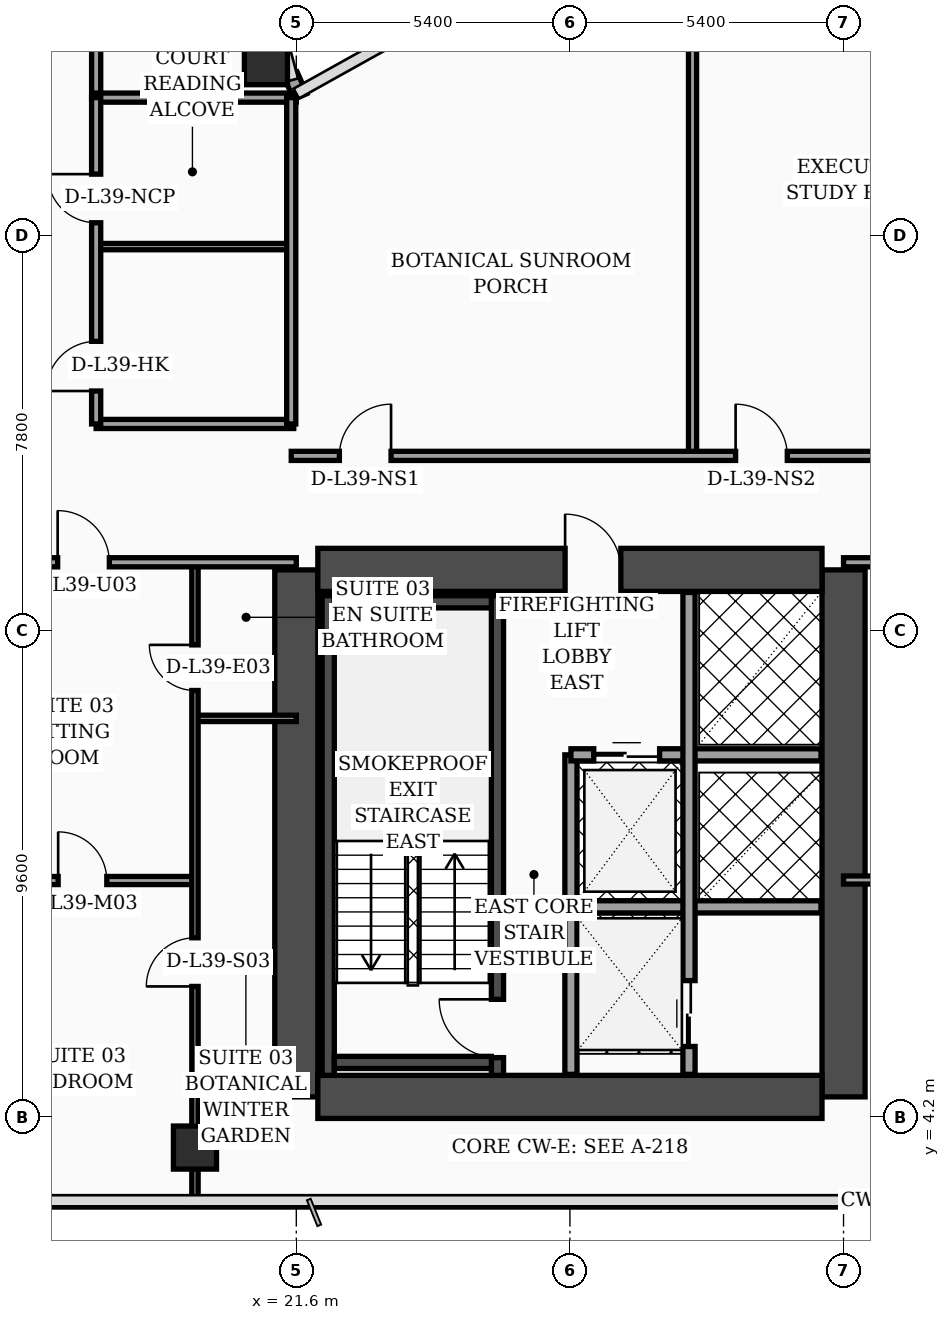
"""IFC4 building model, lengths in metres.
Left out: names, types, materials, properties, quantities, classifications, styles, units other than length and angle.
Written with IfcOpenShell. Run it as: python <this file> out.ifc"""

import sys

from ifc_helpers import new_model, si_unit, direction, frame, frame_2d, origin, origin_2d, place, context, subcontext, project, spatial, rectangle, hollow_rectangle, extrude, element, fill, save


model = new_model("IFC4")
c1 = context("Model", 3, precision=1e-05, world=origin(), true_north=direction((0.0, 1.0)))
c2 = subcontext(c1, "Body", "Model", "MODEL_VIEW")
j1 = project(units=[si_unit("LENGTHUNIT", "METRE"), si_unit("PLANEANGLEUNIT", "RADIAN")], contexts=[c1])
p1 = place(None, origin())
s1 = spatial("IfcSite", under=j1, at=p1, CompositionType="ELEMENT")
p2 = place(p1, origin())
s2 = spatial("IfcBuilding", under=s1, at=p2, CompositionType="ELEMENT")
p3 = place(p2, frame((0.0, 0.0, 159.9)))
s3 = spatial("IfcBuildingStorey", under=s2, at=p3, CompositionType="ELEMENT", Elevation=159.9)
for number, where, z_axis, x_axis in (
    (1, (21.6, 4.6, 0.0), (0.0, 0.0, 1.0), (0.0, 1.0, 0.0)),
    (2, (32.4, 4.6, 0.0), (0.0, 0.0, 1.0), (0.0, 1.0, 0.0)),
):
    element("IfcWall", number, at=place(p3, frame(where, z_axis=z_axis, x_axis=x_axis)), inside=s3, PredefinedType="SHEAR", context=c2, shape_type="SweptSolid", body=[
        extrude(rectangle(XDim=10.4, YDim=0.85, at=frame_2d((5.2, 0.0))), origin(), (0.0, 0.0, 1.0), 3.56),
    ])
p4 = place(p3, frame((22.025, 15.0, 0.0), z_axis=(0.0, 0.0, 1.0), x_axis=(1.0, 0.0, 0.0)))
e3 = element("IfcWall", 3, at=p4, inside=s3, PredefinedType="SHEAR", context=c2, shape_type="SweptSolid", body=[
    extrude(rectangle(XDim=9.95, YDim=0.85, at=frame_2d((4.975, 0.0))), origin(), (0.0, 0.0, 1.0), 3.56),
])
p5 = place(p4, frame((4.88, 0.0, 0.0)))
e4 = element("IfcOpeningElement", 4, at=p5, cuts=e3, PredefinedType="OPENING", context=c2, shape_type="SweptSolid", body=[
    extrude(rectangle(XDim=1.1, YDim=2.2, at=frame_2d((0.55, 1.1))), frame((0.0, 0.435, 0.0), z_axis=(0.0, -1.0, 0.0), x_axis=(1.0, 0.0, 0.0)), (0.0, 0.0, 1.0), 0.87),
])
p6 = place(p3, frame((22.025, 4.6, 0.0), z_axis=(0.0, 0.0, 1.0), x_axis=(1.0, 0.0, 0.0)))
e5 = element("IfcWall", 5, at=p6, inside=s3, PredefinedType="SHEAR", context=c2, shape_type="SweptSolid", body=[
    extrude(rectangle(XDim=9.95, YDim=0.85, at=frame_2d((4.975, 0.0))), origin(), (0.0, 0.0, 1.0), 3.56),
])
p7 = place(p3, frame((22.23, 5.025, 0.0), z_axis=(0.0, 0.0, 1.0), x_axis=(0.0, 1.0, 0.0)))
e6 = element("IfcWall", 6, at=p7, inside=s3, PredefinedType="SOLIDWALL", context=c2, shape_type="SweptSolid", body=[
    extrude(rectangle(XDim=9.465, YDim=0.24, at=frame_2d((4.732, 0.0))), origin(), (0.0, 0.0, 1.0), 3.56),
])
p8 = place(p3, frame((25.57, 5.025, 0.0), z_axis=(0.0, 0.0, 1.0), x_axis=(0.0, 1.0, 0.0)))
e7 = element("IfcWall", 7, at=p8, inside=s3, PredefinedType="SOLIDWALL", context=c2, shape_type="SweptSolid", body=[
    extrude(rectangle(XDim=9.465, YDim=0.24, at=frame_2d((4.732, 0.0))), origin(), (0.0, 0.0, 1.0), 3.56),
])
p9 = place(p8, frame((0.35, 0.0, 0.0)))
e8 = element("IfcOpeningElement", 8, at=p9, cuts=e7, PredefinedType="OPENING", context=c2, shape_type="SweptSolid", body=[
    extrude(rectangle(XDim=1.15, YDim=2.2, at=frame_2d((0.575, 1.1))), frame((0.0, 0.13, 0.0), z_axis=(0.0, -1.0, 0.0), x_axis=(1.0, 0.0, 0.0)), (0.0, 0.0, 1.0), 0.26),
])
for number, where, z_axis, x_axis in (
    (9, (22.35, 5.28, 0.0), (0.0, 0.0, 1.0), (1.0, 0.0, 0.0)),
    (10, (22.35, 14.37, 0.0), (0.0, 0.0, 1.0), (1.0, 0.0, 0.0)),
):
    element("IfcWall", number, at=place(p3, frame(where, z_axis=z_axis, x_axis=x_axis)), inside=s3, PredefinedType="SOLIDWALL", context=c2, shape_type="SweptSolid", body=[
        extrude(rectangle(XDim=3.1, YDim=0.24, at=frame_2d((1.55, 0.0))), origin(), (0.0, 0.0, 1.0), 3.56),
    ])
for number, where, z_axis, x_axis in (
    (11, (21.0, 25.0, 0.0), (0.0, 0.0, 1.0), (1.0, 0.0, 0.0)),
    (12, (19.6, 3.6, 0.0), (0.0, 0.0, 1.0), (1.0, 0.0, 0.0)),
):
    element("IfcColumn", number, at=place(p3, frame(where, z_axis=z_axis, x_axis=x_axis)), inside=s3, PredefinedType="COLUMN", context=c2, shape_type="SweptSolid", body=[
        extrude(hollow_rectangle(XDim=0.85, YDim=0.85, WallThickness=0.036, at=origin_2d()), origin(), (0.0, 0.0, 1.0), 3.56),
    ])
p10 = place(p3, frame((21.68, 24.34, 0.0), z_axis=(0.0, 0.0, 1.0), x_axis=(-0.40758134973, 0.913168901875, 0.0)))
e13 = element("IfcWall", 13, at=p10, inside=s3, PredefinedType="SOLIDWALL", context=c2, shape_type="SweptSolid", body=[
    extrude(rectangle(XDim=0.471, YDim=0.28, at=frame_2d((0.235, 0.0))), origin(), (0.0, 0.0, 1.0), 3.56),
])
p11 = place(p3, frame((27.02, 5.045, 0.0), z_axis=(0.0, 0.0, 1.0), x_axis=(0.0, 1.0, 0.0)))
e14 = element("IfcWall", 14, at=p11, inside=s3, PredefinedType="SOLIDWALL", context=c2, shape_type="SweptSolid", body=[
    extrude(rectangle(XDim=6.305, YDim=0.24, at=frame_2d((3.153, 0.0))), origin(), (0.0, 0.0, 1.0), 3.56),
])
p12 = place(p3, frame((27.02, 11.35, 0.0), z_axis=(0.0, 0.0, 1.0), x_axis=(1.0, 0.0, 0.0)))
e15 = element("IfcWall", 15, at=p12, inside=s3, PredefinedType="SOLIDWALL", context=c2, shape_type="SweptSolid", body=[
    extrude(rectangle(XDim=4.935, YDim=0.24, at=frame_2d((2.468, 0.0))), origin(), (0.0, 0.0, 1.0), 3.56),
])
p13 = place(p12, frame((0.45, 0.0, 0.0)))
e16 = element("IfcOpeningElement", 16, at=p13, cuts=e15, PredefinedType="OPENING", context=c2, shape_type="SweptSolid", body=[
    extrude(rectangle(XDim=1.3, YDim=2.35, at=frame_2d((0.65, 1.175))), frame((0.0, 0.13, 0.0), z_axis=(0.0, -1.0, 0.0), x_axis=(1.0, 0.0, 0.0)), (0.0, 0.0, 1.0), 0.26),
])
p14 = place(p3, frame((27.02, 8.35, 0.0), z_axis=(0.0, 0.0, 1.0), x_axis=(1.0, 0.0, 0.0)))
e17 = element("IfcWall", 17, at=p14, inside=s3, PredefinedType="SOLIDWALL", context=c2, shape_type="SweptSolid", body=[
    extrude(rectangle(XDim=4.935, YDim=0.24, at=frame_2d((2.468, 0.0))), origin(), (0.0, 0.0, 1.0), 3.56),
])
p15 = place(p3, frame((29.35, 5.045, 0.0), z_axis=(0.0, 0.0, 1.0), x_axis=(0.0, 1.0, 0.0)))
e18 = element("IfcWall", 18, at=p15, inside=s3, PredefinedType="SOLIDWALL", context=c2, shape_type="SweptSolid", body=[
    extrude(rectangle(XDim=9.51, YDim=0.24, at=frame_2d((4.755, 0.0))), origin(), (0.0, 0.0, 1.0), 3.56),
])
p16 = place(p15, frame((0.55, 0.0, 0.0)))
e19 = element("IfcOpeningElement", 19, at=p16, cuts=e18, PredefinedType="OPENING", context=c2, shape_type="SweptSolid", body=[
    extrude(rectangle(XDim=1.3, YDim=2.35, at=frame_2d((0.65, 1.175))), frame((0.0, 0.13, 0.0), z_axis=(0.0, -1.0, 0.0), x_axis=(1.0, 0.0, 0.0)), (0.0, 0.0, 1.0), 0.26),
])
p17 = place(p3, frame((19.6, 12.07, 0.0), z_axis=(0.0, 0.0, 1.0), x_axis=(1.0, 0.0, 0.0)))
e20 = element("IfcWall", 20, at=p17, inside=s3, PredefinedType="PARTITIONING", context=c2, shape_type="SweptSolid", body=[
    extrude(rectangle(XDim=2.0, YDim=0.125, at=frame_2d((1.0, 0.0))), origin(), (0.0, 0.0, 1.0), 3.56),
])
p18 = place(p3, frame((15.15, 8.87, 0.0), z_axis=(0.0, 0.0, 1.0), x_axis=(1.0, 0.0, 0.0)))
e21 = element("IfcWall", 21, at=p18, inside=s3, PredefinedType="PARTITIONING", context=c2, shape_type="SweptSolid", body=[
    extrude(rectangle(XDim=4.45, YDim=0.16, at=frame_2d((2.225, 0.0))), origin(), (0.0, 0.0, 1.0), 3.56),
])
p19 = place(p18, frame((1.75, 0.0, 0.0)))
e22 = element("IfcOpeningElement", 22, at=p19, cuts=e21, PredefinedType="OPENING", context=c2, shape_type="SweptSolid", body=[
    extrude(rectangle(XDim=0.96, YDim=2.2, at=frame_2d((0.48, 1.1))), frame((0.0, 0.09, 0.0), z_axis=(0.0, -1.0, 0.0), x_axis=(1.0, 0.0, 0.0)), (0.0, 0.0, 1.0), 0.18),
])
p20 = place(p3, frame((19.6, 2.44, 0.0), z_axis=(0.0, 0.0, 1.0), x_axis=(0.0, 1.0, 0.0)))
e23 = element("IfcWall", 23, at=p20, inside=s3, PredefinedType="PARTITIONING", context=c2, shape_type="SweptSolid", body=[
    extrude(rectangle(XDim=12.71, YDim=0.125, at=frame_2d((6.355, 0.0))), origin(), (0.0, 0.0, 1.0), 2.49),
])
p21 = place(p20, frame((4.34, 0.0, 0.0)))
e24 = element("IfcOpeningElement", 24, at=p21, cuts=e23, PredefinedType="OPENING", context=c2, shape_type="SweptSolid", body=[
    extrude(rectangle(XDim=0.96, YDim=2.2, at=frame_2d((0.48, 1.1))), frame((0.0, 0.073, 0.0), z_axis=(0.0, -1.0, 0.0), x_axis=(1.0, 0.0, 0.0)), (0.0, 0.0, 1.0), 0.145),
])
p22 = place(p20, frame((10.18, 0.0, 0.0)))
e25 = element("IfcOpeningElement", 25, at=p22, cuts=e23, PredefinedType="OPENING", context=c2, shape_type="SweptSolid", body=[
    extrude(rectangle(XDim=0.9, YDim=2.15, at=frame_2d((0.45, 1.075))), frame((0.0, 0.073, 0.0), z_axis=(0.0, -1.0, 0.0), x_axis=(1.0, 0.0, 0.0)), (0.0, 0.0, 1.0), 0.145),
])
p23 = place(p3, frame((15.15, 15.15, 0.0), z_axis=(0.0, 0.0, 1.0), x_axis=(1.0, 0.0, 0.0)))
e26 = element("IfcWall", 26, at=p23, inside=s3, PredefinedType="PARTITIONING", context=c2, shape_type="SweptSolid", body=[
    extrude(rectangle(XDim=6.45, YDim=0.18, at=frame_2d((3.225, 0.0))), origin(), (0.0, 0.0, 1.0), 2.49),
])
p24 = place(p23, frame((1.74, 0.0, 0.0)))
e27 = element("IfcOpeningElement", 27, at=p24, cuts=e26, PredefinedType="OPENING", context=c2, shape_type="SweptSolid", body=[
    extrude(rectangle(XDim=1.02, YDim=2.2, at=frame_2d((0.51, 1.1))), frame((0.0, 0.1, 0.0), z_axis=(0.0, -1.0, 0.0), x_axis=(1.0, 0.0, 0.0)), (0.0, 0.0, 1.0), 0.2),
])
p25 = place(p3, frame((17.65, 24.3, 0.0), z_axis=(0.0, 0.0, 1.0), x_axis=(0.0, 1.0, 0.0)))
e28 = element("IfcWall", 28, at=p25, inside=s3, PredefinedType="PARTITIONING", context=c2, shape_type="SweptSolid", body=[
    extrude(rectangle(XDim=17.65, YDim=0.18, at=frame_2d((8.825, 0.0))), origin(), (0.0, 0.0, 1.0), 2.94),
])
p26 = place(p3, frame((17.65, 17.88, 0.0), z_axis=(0.0, 0.0, 1.0), x_axis=(1.0, 0.0, 0.0)))
e29 = element("IfcWall", 29, at=p26, inside=s3, PredefinedType="PARTITIONING", context=c2, shape_type="SweptSolid", body=[
    extrude(rectangle(XDim=3.9, YDim=0.18, at=frame_2d((1.95, 0.0))), origin(), (0.0, 0.0, 1.0), 3.56),
])
p27 = place(p3, frame((17.65, 21.38, 0.0), z_axis=(0.0, 0.0, 1.0), x_axis=(1.0, 0.0, 0.0)))
e30 = element("IfcWall", 30, at=p27, inside=s3, PredefinedType="PARTITIONING", context=c2, shape_type="SweptSolid", body=[
    extrude(rectangle(XDim=3.9, YDim=0.125, at=frame_2d((1.95, 0.0))), origin(), (0.0, 0.0, 1.0), 3.09),
])
p28 = place(p3, frame((17.65, 24.32, 0.0), z_axis=(0.0, 0.0, 1.0), x_axis=(1.0, 0.0, 0.0)))
e31 = element("IfcWall", 31, at=p28, inside=s3, PredefinedType="PARTITIONING", context=c2, shape_type="SweptSolid", body=[
    extrude(rectangle(XDim=3.95, YDim=0.18, at=frame_2d((1.975, 0.0))), origin(), (0.0, 0.0, 1.0), 3.56),
])
p29 = place(p3, frame((21.5, 17.88, 0.0), z_axis=(0.0, 0.0, 1.0), x_axis=(0.0, 1.0, 0.0)))
e32 = element("IfcWall", 32, at=p29, inside=s3, PredefinedType="PARTITIONING", context=c2, shape_type="SweptSolid", body=[
    extrude(rectangle(XDim=6.44, YDim=0.18, at=frame_2d((3.22, 0.0))), origin(), (0.0, 0.0, 1.0), 3.09),
])
p30 = place(p3, frame((17.65, 17.88, 0.0), z_axis=(0.0, 0.0, 1.0), x_axis=(0.0, 1.0, 0.0)))
e33 = element("IfcWall", 33, at=p30, inside=s3, PredefinedType="PARTITIONING", context=c2, shape_type="SweptSolid", body=[
    extrude(rectangle(XDim=6.44, YDim=0.18, at=frame_2d((3.22, 0.0))), origin(), (0.0, 0.0, 1.0), 3.09),
])
p31 = place(p30, frame((0.65, 0.0, 0.0)))
e34 = element("IfcOpeningElement", 34, at=p31, cuts=e33, PredefinedType="OPENING", context=c2, shape_type="SweptSolid", body=[
    extrude(rectangle(XDim=0.98, YDim=2.15, at=frame_2d((0.49, 1.075))), frame((0.0, 0.1, 0.0), z_axis=(0.0, -1.0, 0.0), x_axis=(1.0, 0.0, 0.0)), (0.0, 0.0, 1.0), 0.2),
])
p32 = place(p30, frame((3.97, 0.0, 0.0)))
e35 = element("IfcOpeningElement", 35, at=p32, cuts=e33, PredefinedType="OPENING", context=c2, shape_type="SweptSolid", body=[
    extrude(rectangle(XDim=0.96, YDim=2.2, at=frame_2d((0.48, 1.1))), frame((0.0, 0.1, 0.0), z_axis=(0.0, -1.0, 0.0), x_axis=(1.0, 0.0, 0.0)), (0.0, 0.0, 1.0), 0.2),
])
p33 = place(p3, frame((32.4, 8.88, 0.0), z_axis=(0.0, 0.0, 1.0), x_axis=(1.0, 0.0, 0.0)))
e36 = element("IfcWall", 36, at=p33, inside=s3, PredefinedType="PARTITIONING", context=c2, shape_type="SweptSolid", body=[
    extrude(rectangle(XDim=4.82, YDim=0.16, at=frame_2d((2.41, 0.0))), origin(), (0.0, 0.0, 1.0), 2.94),
])
p34 = place(p33, frame((1.93, 0.0, 0.0)))
e37 = element("IfcOpeningElement", 37, at=p34, cuts=e36, PredefinedType="OPENING", context=c2, shape_type="SweptSolid", body=[
    extrude(rectangle(XDim=0.96, YDim=2.2, at=frame_2d((0.48, 1.1))), frame((0.0, 0.09, 0.0), z_axis=(0.0, -1.0, 0.0), x_axis=(1.0, 0.0, 0.0)), (0.0, 0.0, 1.0), 0.18),
])
p35 = place(p3, frame((32.4, 15.15, 0.0), z_axis=(0.0, 0.0, 1.0), x_axis=(1.0, 0.0, 0.0)))
e38 = element("IfcWall", 38, at=p35, inside=s3, PredefinedType="PARTITIONING", context=c2, shape_type="SweptSolid", body=[
    extrude(rectangle(XDim=13.05, YDim=0.18, at=frame_2d((6.525, 0.0))), origin(), (0.0, 0.0, 1.0), 2.94),
])
p36 = place(p35, frame((2.0, 0.0, 0.0)))
e39 = element("IfcOpeningElement", 39, at=p36, cuts=e38, PredefinedType="OPENING", context=c2, shape_type="SweptSolid", body=[
    extrude(rectangle(XDim=1.02, YDim=2.2, at=frame_2d((0.51, 1.1))), frame((0.0, 0.1, 0.0), z_axis=(0.0, -1.0, 0.0), x_axis=(1.0, 0.0, 0.0)), (0.0, 0.0, 1.0), 0.2),
])
p37 = place(p35, frame((8.43, 0.0, 0.0)))
e40 = element("IfcOpeningElement", 40, at=p37, cuts=e38, PredefinedType="OPENING", context=c2, shape_type="SweptSolid", body=[
    extrude(rectangle(XDim=1.02, YDim=2.2, at=frame_2d((0.51, 1.1))), frame((0.0, 0.1, 0.0), z_axis=(0.0, -1.0, 0.0), x_axis=(1.0, 0.0, 0.0)), (0.0, 0.0, 1.0), 0.2),
])
p38 = place(p3, frame((29.42, 17.25, 0.0), z_axis=(0.0, 0.0, 1.0), x_axis=(0.0, 1.0, 0.0)))
e41 = element("IfcWall", 41, at=p38, inside=s3, PredefinedType="PARTITIONING", context=c2, shape_type="SweptSolid", body=[
    extrude(rectangle(XDim=11.59, YDim=0.16, at=frame_2d((5.795, 0.0))), origin(), (0.0, 0.0, 1.0), 2.94),
])
p39 = place(p3, frame((21.5, 17.25, 0.0), z_axis=(0.0, 0.0, 1.0), x_axis=(1.0, 0.0, 0.0)))
e42 = element("IfcWall", 42, at=p39, inside=s3, PredefinedType="PARTITIONING", context=c2, shape_type="SweptSolid", body=[
    extrude(rectangle(XDim=21.6, YDim=0.18, at=frame_2d((10.8, 0.0))), origin(), (0.0, 0.0, 1.0), 2.94),
])
p40 = place(p39, frame((0.95, 0.0, 0.0)))
e43 = element("IfcOpeningElement", 43, at=p40, cuts=e42, PredefinedType="OPENING", context=c2, shape_type="SweptSolid", body=[
    extrude(rectangle(XDim=1.02, YDim=2.2, at=frame_2d((0.51, 1.1))), frame((0.0, 0.1, 0.0), z_axis=(0.0, -1.0, 0.0), x_axis=(1.0, 0.0, 0.0)), (0.0, 0.0, 1.0), 0.2),
])
p41 = place(p39, frame((8.77, 0.0, 0.0)))
e44 = element("IfcOpeningElement", 44, at=p41, cuts=e42, PredefinedType="OPENING", context=c2, shape_type="SweptSolid", body=[
    extrude(rectangle(XDim=1.02, YDim=2.2, at=frame_2d((0.51, 1.1))), frame((0.0, 0.1, 0.0), z_axis=(0.0, -1.0, 0.0), x_axis=(1.0, 0.0, 0.0)), (0.0, 0.0, 1.0), 0.2),
])
p42 = place(p39, frame((15.28, 0.0, 0.0)))
e45 = element("IfcOpeningElement", 45, at=p42, cuts=e42, PredefinedType="OPENING", context=c2, shape_type="SweptSolid", body=[
    extrude(rectangle(XDim=1.02, YDim=2.2, at=frame_2d((0.51, 1.1))), frame((0.0, 0.1, 0.0), z_axis=(0.0, -1.0, 0.0), x_axis=(1.0, 0.0, 0.0)), (0.0, 0.0, 1.0), 0.2),
])
p43 = place(p13, origin())
e46 = element("IfcDoor", 46, at=p43, inside=s3, OperationType="DOUBLE_DOOR_SLIDING", PredefinedType="DOOR", context=c2, shape_type="SweptSolid", body=[
    extrude(rectangle(XDim=1.3, YDim=2.35, at=frame_2d((0.65, 1.175))), frame((0.0, 0.025, 0.0), z_axis=(0.0, -1.0, 0.0), x_axis=(1.0, 0.0, 0.0)), (0.0, 0.0, 1.0), 0.05),
])
fill(e16, e46)
p44 = place(p16, origin())
e47 = element("IfcDoor", 47, at=p44, inside=s3, OperationType="DOUBLE_DOOR_SLIDING", PredefinedType="DOOR", context=c2, shape_type="SweptSolid", body=[
    extrude(rectangle(XDim=1.3, YDim=2.35, at=frame_2d((0.65, 1.175))), frame((0.0, 0.025, 0.0), z_axis=(0.0, -1.0, 0.0), x_axis=(1.0, 0.0, 0.0)), (0.0, 0.0, 1.0), 0.05),
])
fill(e19, e47)
p45 = place(p19, origin())
e48 = element("IfcDoor", 48, at=p45, inside=s3, OperationType="SINGLE_SWING_LEFT", PredefinedType="DOOR", context=c2, shape_type="SweptSolid", body=[
    extrude(rectangle(XDim=0.96, YDim=2.2, at=frame_2d((0.48, 1.1))), frame((0.0, 0.025, 0.0), z_axis=(0.0, -1.0, 0.0), x_axis=(1.0, 0.0, 0.0)), (0.0, 0.0, 1.0), 0.05),
])
fill(e22, e48)
p46 = place(p21, origin())
e49 = element("IfcDoor", 49, at=p46, inside=s3, OperationType="SINGLE_SWING_LEFT", PredefinedType="DOOR", context=c2, shape_type="SweptSolid", body=[
    extrude(rectangle(XDim=0.96, YDim=2.2, at=frame_2d((0.48, 1.1))), frame((0.0, 0.025, 0.0), z_axis=(0.0, -1.0, 0.0), x_axis=(1.0, 0.0, 0.0)), (0.0, 0.0, 1.0), 0.05),
])
fill(e24, e49)
p47 = place(p22, origin())
e50 = element("IfcDoor", 50, at=p47, inside=s3, OperationType="SINGLE_SWING_RIGHT", PredefinedType="DOOR", context=c2, shape_type="SweptSolid", body=[
    extrude(rectangle(XDim=0.9, YDim=2.15, at=frame_2d((0.45, 1.075))), frame((0.0, 0.025, 0.0), z_axis=(0.0, -1.0, 0.0), x_axis=(1.0, 0.0, 0.0)), (0.0, 0.0, 1.0), 0.05),
])
fill(e25, e50)
p48 = place(p24, origin())
e51 = element("IfcDoor", 51, at=p48, inside=s3, OperationType="SINGLE_SWING_LEFT", PredefinedType="DOOR", context=c2, shape_type="SweptSolid", body=[
    extrude(rectangle(XDim=1.02, YDim=2.2, at=frame_2d((0.51, 1.1))), frame((0.0, 0.025, 0.0), z_axis=(0.0, -1.0, 0.0), x_axis=(1.0, 0.0, 0.0)), (0.0, 0.0, 1.0), 0.05),
])
fill(e27, e51)
p49 = place(p31, origin())
e52 = element("IfcDoor", 52, at=p49, inside=s3, OperationType="SINGLE_SWING_LEFT", PredefinedType="DOOR", context=c2, shape_type="SweptSolid", body=[
    extrude(rectangle(XDim=0.98, YDim=2.15, at=frame_2d((0.49, 1.075))), frame((0.0, 0.025, 0.0), z_axis=(0.0, -1.0, 0.0), x_axis=(1.0, 0.0, 0.0)), (0.0, 0.0, 1.0), 0.05),
])
fill(e34, e52)
p50 = place(p32, origin())
e53 = element("IfcDoor", 53, at=p50, inside=s3, OperationType="SINGLE_SWING_RIGHT", PredefinedType="DOOR", context=c2, shape_type="SweptSolid", body=[
    extrude(rectangle(XDim=0.96, YDim=2.2, at=frame_2d((0.48, 1.1))), frame((0.0, 0.025, 0.0), z_axis=(0.0, -1.0, 0.0), x_axis=(1.0, 0.0, 0.0)), (0.0, 0.0, 1.0), 0.05),
])
fill(e35, e53)
p51 = place(p40, origin())
e54 = element("IfcDoor", 54, at=p51, inside=s3, OperationType="SINGLE_SWING_RIGHT", PredefinedType="DOOR", context=c2, shape_type="SweptSolid", body=[
    extrude(rectangle(XDim=1.02, YDim=2.2, at=frame_2d((0.51, 1.1))), frame((0.0, 0.025, 0.0), z_axis=(0.0, -1.0, 0.0), x_axis=(1.0, 0.0, 0.0)), (0.0, 0.0, 1.0), 0.05),
])
fill(e43, e54)
p52 = place(p41, origin())
e55 = element("IfcDoor", 55, at=p52, inside=s3, OperationType="SINGLE_SWING_LEFT", PredefinedType="DOOR", context=c2, shape_type="SweptSolid", body=[
    extrude(rectangle(XDim=1.02, YDim=2.2, at=frame_2d((0.51, 1.1))), frame((0.0, 0.025, 0.0), z_axis=(0.0, -1.0, 0.0), x_axis=(1.0, 0.0, 0.0)), (0.0, 0.0, 1.0), 0.05),
])
fill(e44, e55)
p53 = place(p9, origin())
e56 = element("IfcDoor", 56, at=p53, inside=s3, OperationType="SINGLE_SWING_RIGHT", PredefinedType="DOOR", context=c2, shape_type="SweptSolid", body=[
    extrude(rectangle(XDim=1.15, YDim=2.2, at=frame_2d((0.575, 1.1))), frame((0.0, 0.025, 0.0), z_axis=(0.0, -1.0, 0.0), x_axis=(1.0, 0.0, 0.0)), (0.0, 0.0, 1.0), 0.05),
])
fill(e8, e56)
p54 = place(p5, origin())
e57 = element("IfcDoor", 57, at=p54, inside=s3, OperationType="SINGLE_SWING_LEFT", PredefinedType="DOOR", context=c2, shape_type="SweptSolid", body=[
    extrude(rectangle(XDim=1.1, YDim=2.2, at=frame_2d((0.55, 1.1))), frame((0.0, 0.025, 0.0), z_axis=(0.0, -1.0, 0.0), x_axis=(1.0, 0.0, 0.0)), (0.0, 0.0, 1.0), 0.05),
])
fill(e4, e57)
save(model, sys.argv[1])
